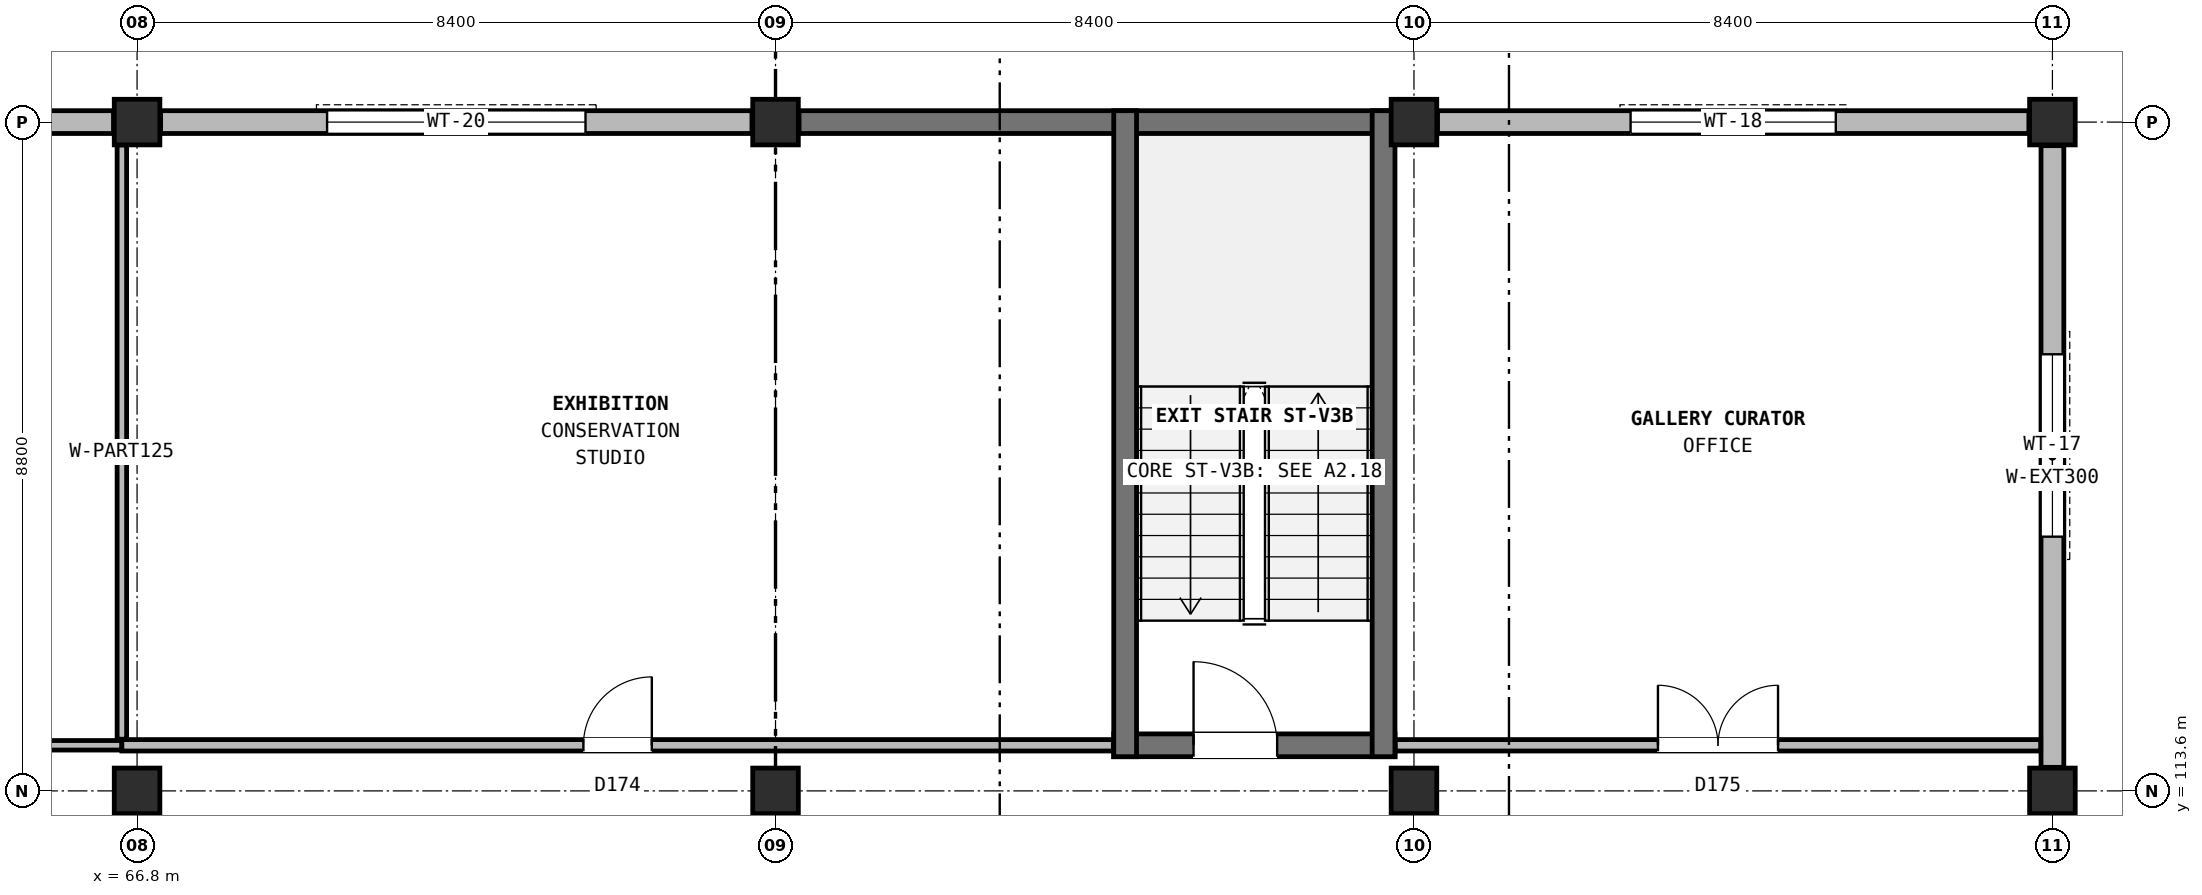
"""IFC4 building model, lengths in metres.
Left out: names, types, materials, properties, quantities, classifications, styles, units other than length and angle.
Written with IfcOpenShell. Run it as: python <this file> out.ifc"""

import sys

from ifc_helpers import new_model, si_unit, direction, frame, frame_2d, origin, origin_2d, place, context, subcontext, project, spatial, rectangle, extrude, element, fill, save


model = new_model("IFC4")
c1 = context("Model", 3, precision=1e-05, world=origin(), true_north=direction((0.0, 1.0)))
c2 = subcontext(c1, "Body", "Model", "MODEL_VIEW")
j1 = project(units=[si_unit("LENGTHUNIT", "METRE"), si_unit("PLANEANGLEUNIT", "RADIAN")], contexts=[c1])
p1 = place(None, origin())
s1 = spatial("IfcSite", under=j1, at=p1, CompositionType="ELEMENT")
p2 = place(p1, origin())
s2 = spatial("IfcBuilding", under=s1, at=p2, CompositionType="ELEMENT")
p3 = place(p2, frame((0.0, 0.0, 9.0)))
s3 = spatial("IfcBuildingStorey", under=s2, at=p3, CompositionType="ELEMENT", Elevation=9.0)
for number, where, z_axis, x_axis in (
    (1, (66.8, 113.6, 0.0), (0.0, 0.0, 1.0), (1.0, 0.0, 0.0)),
    (2, (66.8, 122.4, 0.0), (0.0, 0.0, 1.0), (1.0, 0.0, 0.0)),
    (3, (75.2, 113.6, 0.0), (0.0, 0.0, 1.0), (1.0, 0.0, 0.0)),
    (4, (75.2, 122.4, 0.0), (0.0, 0.0, 1.0), (1.0, 0.0, 0.0)),
    (5, (83.6, 113.6, 0.0), (0.0, 0.0, 1.0), (1.0, 0.0, 0.0)),
    (6, (83.6, 122.4, 0.0), (0.0, 0.0, 1.0), (1.0, 0.0, 0.0)),
    (7, (92.0, 113.6, 0.0), (0.0, 0.0, 1.0), (1.0, 0.0, 0.0)),
    (8, (92.0, 122.4, 0.0), (0.0, 0.0, 1.0), (1.0, 0.0, 0.0)),
):
    element("IfcColumn", number, at=place(p3, frame(where, z_axis=z_axis, x_axis=x_axis)), inside=s3, PredefinedType="COLUMN", context=c2, shape_type="SweptSolid", body=[
        extrude(rectangle(XDim=0.6, YDim=0.6, at=origin_2d()), origin(), (0.0, 0.0, 1.0), 4.2),
    ])
p4 = place(p3, frame((92.0, 105.11, 0.0), z_axis=(0.0, 0.0, 1.0), x_axis=(0.0, 1.0, 0.0)))
e9 = element("IfcWall", 9, at=p4, inside=s3, PredefinedType="SOLIDWALL", context=c2, shape_type="SweptSolid", body=[
    extrude(rectangle(XDim=8.18, YDim=0.3, at=frame_2d((4.09, 0.0))), origin(), (0.0, 0.0, 1.0), 3.45),
])
p5 = place(p4, frame((1.895, 0.0, 0.9)))
e10 = element("IfcOpeningElement", 10, at=p5, cuts=e9, PredefinedType="OPENING", context=c2, shape_type="SweptSolid", body=[
    extrude(rectangle(XDim=2.1, YDim=2.3, at=frame_2d((1.05, 1.15))), frame((0.0, 0.16, 0.0), z_axis=(0.0, -1.0, 0.0), x_axis=(1.0, 0.0, 0.0)), (0.0, 0.0, 1.0), 0.32),
])
p6 = place(p3, frame((92.0, 113.91, 0.0), z_axis=(0.0, 0.0, 1.0), x_axis=(0.0, 1.0, 0.0)))
e11 = element("IfcWall", 11, at=p6, inside=s3, PredefinedType="SOLIDWALL", context=c2, shape_type="SweptSolid", body=[
    extrude(rectangle(XDim=8.18, YDim=0.3, at=frame_2d((4.09, 0.0))), origin(), (0.0, 0.0, 1.0), 3.45),
])
p7 = place(p6, frame((3.035, 0.0, 0.9)))
e12 = element("IfcOpeningElement", 12, at=p7, cuts=e11, PredefinedType="OPENING", context=c2, shape_type="SweptSolid", body=[
    extrude(rectangle(XDim=2.4, YDim=2.35, at=frame_2d((1.2, 1.175))), frame((0.0, 0.16, 0.0), z_axis=(0.0, -1.0, 0.0), x_axis=(1.0, 0.0, 0.0)), (0.0, 0.0, 1.0), 0.32),
])
p8 = place(p3, frame((91.69, 122.4, 0.0), z_axis=(0.0, 0.0, 1.0), x_axis=(-1.0, 0.0, 0.0)))
e13 = element("IfcWall", 13, at=p8, inside=s3, PredefinedType="SOLIDWALL", context=c2, shape_type="SweptSolid", body=[
    extrude(rectangle(XDim=7.78, YDim=0.3, at=frame_2d((3.89, 0.0))), origin(), (0.0, 0.0, 1.0), 3.45),
])
p9 = place(p8, frame((2.54, 0.0, 0.9)))
e14 = element("IfcOpeningElement", 14, at=p9, cuts=e13, PredefinedType="OPENING", context=c2, shape_type="SweptSolid", body=[
    extrude(rectangle(XDim=2.7, YDim=2.35, at=frame_2d((1.35, 1.175))), frame((0.0, 0.16, 0.0), z_axis=(0.0, -1.0, 0.0), x_axis=(1.0, 0.0, 0.0)), (0.0, 0.0, 1.0), 0.32),
])
p10 = place(p3, frame((83.29, 122.4, 0.0), z_axis=(0.0, 0.0, 1.0), x_axis=(-1.0, 0.0, 0.0)))
e15 = element("IfcWall", 15, at=p10, inside=s3, PredefinedType="SHEAR", context=c2, shape_type="SweptSolid", body=[
    extrude(rectangle(XDim=7.78, YDim=0.3, at=frame_2d((3.89, 0.0))), origin(), (0.0, 0.0, 1.0), 3.45),
])
p11 = place(p3, frame((74.89, 122.4, 0.0), z_axis=(0.0, 0.0, 1.0), x_axis=(-1.0, 0.0, 0.0)))
e16 = element("IfcWall", 16, at=p11, inside=s3, PredefinedType="SOLIDWALL", context=c2, shape_type="SweptSolid", body=[
    extrude(rectangle(XDim=7.78, YDim=0.3, at=frame_2d((3.89, 0.0))), origin(), (0.0, 0.0, 1.0), 3.45),
])
p12 = place(p11, frame((2.19, 0.0, 0.9)))
e17 = element("IfcOpeningElement", 17, at=p12, cuts=e16, PredefinedType="OPENING", context=c2, shape_type="SweptSolid", body=[
    extrude(rectangle(XDim=3.4, YDim=2.15, at=frame_2d((1.7, 1.075))), frame((0.0, 0.16, 0.0), z_axis=(0.0, -1.0, 0.0), x_axis=(1.0, 0.0, 0.0)), (0.0, 0.0, 1.0), 0.32),
])
p13 = place(p3, frame((66.49, 122.4, 0.0), z_axis=(0.0, 0.0, 1.0), x_axis=(-1.0, 0.0, 0.0)))
e18 = element("IfcWall", 18, at=p13, inside=s3, PredefinedType="SOLIDWALL", context=c2, shape_type="SweptSolid", body=[
    extrude(rectangle(XDim=7.78, YDim=0.3, at=frame_2d((3.89, 0.0))), origin(), (0.0, 0.0, 1.0), 3.45),
])
p14 = place(p13, frame((3.415, 0.0, 0.9)))
e19 = element("IfcOpeningElement", 19, at=p14, cuts=e18, PredefinedType="OPENING", context=c2, shape_type="SweptSolid", body=[
    extrude(rectangle(XDim=0.95, YDim=1.6, at=frame_2d((0.475, 0.8))), frame((0.0, 0.16, 0.0), z_axis=(0.0, -1.0, 0.0), x_axis=(1.0, 0.0, 0.0)), (0.0, 0.0, 1.0), 0.32),
])
p15 = place(p3, frame((79.65, 114.2, 0.0), z_axis=(0.0, 0.0, 1.0), x_axis=(1.0, 0.0, 0.0)))
e20 = element("IfcWall", 20, at=p15, inside=s3, PredefinedType="SHEAR", context=c2, shape_type="SweptSolid", body=[
    extrude(rectangle(XDim=3.7, YDim=0.3, at=frame_2d((1.85, 0.0))), origin(), (0.0, 0.0, 1.0), 4.2),
])
p16 = place(p15, frame((1.05, 0.0, 0.0)))
e21 = element("IfcOpeningElement", 21, at=p16, cuts=e20, PredefinedType="OPENING", context=c2, shape_type="SweptSolid", body=[
    extrude(rectangle(XDim=1.1, YDim=2.2, at=frame_2d((0.55, 1.1))), frame((0.0, 0.16, 0.0), z_axis=(0.0, -1.0, 0.0), x_axis=(1.0, 0.0, 0.0)), (0.0, 0.0, 1.0), 0.32),
])
for number, where, z_axis, x_axis in (
    (22, (79.8, 114.05, 0.0), (0.0, 0.0, 1.0), (0.0, 1.0, 0.0)),
    (23, (83.2, 114.05, 0.0), (0.0, 0.0, 1.0), (0.0, 1.0, 0.0)),
):
    element("IfcWall", number, at=place(p3, frame(where, z_axis=z_axis, x_axis=x_axis)), inside=s3, PredefinedType="SHEAR", context=c2, shape_type="SweptSolid", body=[
        extrude(rectangle(XDim=8.5, YDim=0.3, at=frame_2d((4.25, 0.0))), origin(), (0.0, 0.0, 1.0), 4.2),
    ])
p17 = place(p3, frame((58.2, 114.2, 0.0), z_axis=(0.0, 0.0, 1.0), x_axis=(1.0, 0.0, 0.0)))
e24 = element("IfcWall", 24, at=p17, inside=s3, PredefinedType="PARTITIONING", context=c2, shape_type="SweptSolid", body=[
    extrude(rectangle(XDim=8.4, YDim=0.125, at=frame_2d((4.2, 0.0))), origin(), (0.0, 0.0, 1.0), 3.865),
])
p18 = place(p17, frame((3.71, 0.0, 0.0)))
e25 = element("IfcOpeningElement", 25, at=p18, cuts=e24, PredefinedType="OPENING", context=c2, shape_type="SweptSolid", body=[
    extrude(rectangle(XDim=0.98, YDim=2.1, at=frame_2d((0.49, 1.05))), frame((0.0, 0.073, 0.0), z_axis=(0.0, -1.0, 0.0), x_axis=(1.0, 0.0, 0.0)), (0.0, 0.0, 1.0), 0.145),
])
p19 = place(p3, frame((66.6, 114.2, 0.0), z_axis=(0.0, 0.0, 1.0), x_axis=(1.0, 0.0, 0.0)))
e26 = element("IfcWall", 26, at=p19, inside=s3, PredefinedType="PARTITIONING", context=c2, shape_type="SweptSolid", body=[
    extrude(rectangle(XDim=13.045, YDim=0.15, at=frame_2d((6.522, 0.0))), origin(), (0.0, 0.0, 1.0), 3.865),
])
p20 = place(p19, frame((6.073, 0.0, 0.0)))
e27 = element("IfcOpeningElement", 27, at=p20, cuts=e26, PredefinedType="OPENING", context=c2, shape_type="SweptSolid", body=[
    extrude(rectangle(XDim=0.9, YDim=2.12, at=frame_2d((0.45, 1.06))), frame((0.0, 0.085, 0.0), z_axis=(0.0, -1.0, 0.0), x_axis=(1.0, 0.0, 0.0)), (0.0, 0.0, 1.0), 0.17),
])
p21 = place(p3, frame((83.355, 114.2, 0.0), z_axis=(0.0, 0.0, 1.0), x_axis=(1.0, 0.0, 0.0)))
e28 = element("IfcWall", 28, at=p21, inside=s3, PredefinedType="PARTITIONING", context=c2, shape_type="SweptSolid", body=[
    extrude(rectangle(XDim=8.49, YDim=0.15, at=frame_2d((4.245, 0.0))), origin(), (0.0, 0.0, 1.0), 3.865),
])
p22 = place(p21, frame((3.455, 0.0, 0.0)))
e29 = element("IfcOpeningElement", 29, at=p22, cuts=e28, PredefinedType="OPENING", context=c2, shape_type="SweptSolid", body=[
    extrude(rectangle(XDim=1.58, YDim=2.25, at=frame_2d((0.79, 1.125))), frame((0.0, 0.085, 0.0), z_axis=(0.0, -1.0, 0.0), x_axis=(1.0, 0.0, 0.0)), (0.0, 0.0, 1.0), 0.17),
])
p23 = place(p3, frame((66.6, 114.28, 0.0), z_axis=(0.0, 0.0, 1.0), x_axis=(0.0, 1.0, 0.0)))
e30 = element("IfcWall", 30, at=p23, inside=s3, PredefinedType="PARTITIONING", context=c2, shape_type="SweptSolid", body=[
    extrude(rectangle(XDim=7.82, YDim=0.125, at=frame_2d((3.91, 0.0))), origin(), (0.0, 0.0, 1.0), 3.445),
])
p24 = place(p7, origin())
e31 = element("IfcWindow", 31, at=p24, inside=s3, PartitioningType="SINGLE_PANEL", PredefinedType="WINDOW", context=c2, shape_type="SweptSolid", body=[
    extrude(rectangle(XDim=2.4, YDim=2.35, at=frame_2d((1.2, 1.175))), frame((0.0, 0.03, 0.0), z_axis=(0.0, -1.0, 0.0), x_axis=(1.0, 0.0, 0.0)), (0.0, 0.0, 1.0), 0.06),
])
fill(e12, e31)
p25 = place(p9, origin())
e32 = element("IfcWindow", 32, at=p25, inside=s3, PartitioningType="SINGLE_PANEL", PredefinedType="WINDOW", context=c2, shape_type="SweptSolid", body=[
    extrude(rectangle(XDim=2.7, YDim=2.35, at=frame_2d((1.35, 1.175))), frame((0.0, 0.03, 0.0), z_axis=(0.0, -1.0, 0.0), x_axis=(1.0, 0.0, 0.0)), (0.0, 0.0, 1.0), 0.06),
])
fill(e14, e32)
p26 = place(p12, origin())
e33 = element("IfcWindow", 33, at=p26, inside=s3, PartitioningType="SINGLE_PANEL", PredefinedType="WINDOW", context=c2, shape_type="SweptSolid", body=[
    extrude(rectangle(XDim=3.4, YDim=2.15, at=frame_2d((1.7, 1.075))), frame((0.0, 0.03, 0.0), z_axis=(0.0, -1.0, 0.0), x_axis=(1.0, 0.0, 0.0)), (0.0, 0.0, 1.0), 0.06),
])
fill(e17, e33)
p27 = place(p16, origin())
e34 = element("IfcDoor", 34, at=p27, inside=s3, OperationType="SINGLE_SWING_LEFT", PredefinedType="DOOR", context=c2, shape_type="SweptSolid", body=[
    extrude(rectangle(XDim=1.1, YDim=2.2, at=frame_2d((0.55, 1.1))), frame((0.0, 0.025, 0.0), z_axis=(0.0, -1.0, 0.0), x_axis=(1.0, 0.0, 0.0)), (0.0, 0.0, 1.0), 0.05),
])
fill(e21, e34)
p28 = place(p20, origin())
e35 = element("IfcDoor", 35, at=p28, inside=s3, OperationType="SINGLE_SWING_RIGHT", PredefinedType="DOOR", context=c2, shape_type="SweptSolid", body=[
    extrude(rectangle(XDim=0.9, YDim=2.12, at=frame_2d((0.45, 1.06))), frame((0.0, 0.025, 0.0), z_axis=(0.0, -1.0, 0.0), x_axis=(1.0, 0.0, 0.0)), (0.0, 0.0, 1.0), 0.05),
])
fill(e27, e35)
p29 = place(p22, origin())
e36 = element("IfcDoor", 36, at=p29, inside=s3, OperationType="DOUBLE_DOOR_SINGLE_SWING", PredefinedType="DOOR", context=c2, shape_type="SweptSolid", body=[
    extrude(rectangle(XDim=1.58, YDim=2.25, at=frame_2d((0.79, 1.125))), frame((0.0, 0.025, 0.0), z_axis=(0.0, -1.0, 0.0), x_axis=(1.0, 0.0, 0.0)), (0.0, 0.0, 1.0), 0.05),
])
fill(e29, e36)
save(model, sys.argv[1])
